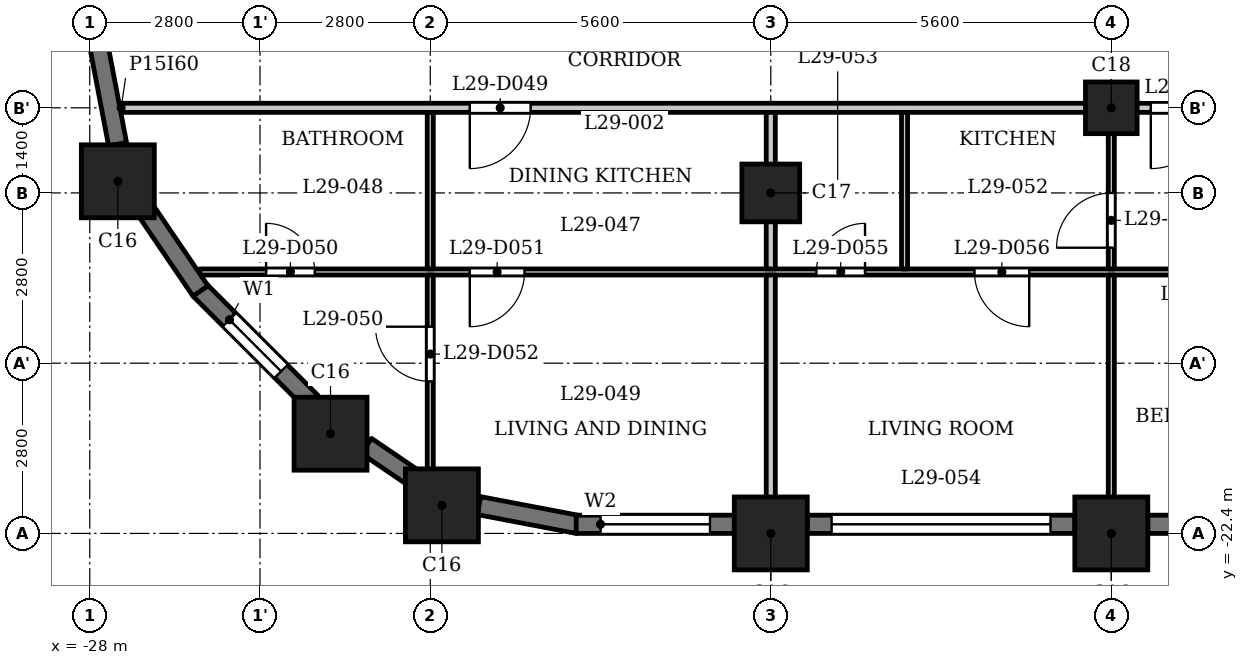
"""IFC4 building model, lengths in metres.
Left out: names, types, materials, properties, quantities, classifications, styles, units other than length and angle.
Written with IfcOpenShell. Run it as: python <this file> out.ifc"""

import sys

from ifc_helpers import new_model, si_unit, direction, frame, frame_2d, origin, origin_2d, place, context, subcontext, project, spatial, rectangle, extrude, element, fill, save


model = new_model("IFC4")
c1 = context("Model", 3, precision=1e-05, world=origin(), true_north=direction((0.0, 1.0)))
c2 = subcontext(c1, "Body", "Model", "MODEL_VIEW")
j1 = project(units=[si_unit("LENGTHUNIT", "METRE"), si_unit("PLANEANGLEUNIT", "RADIAN")], contexts=[c1])
p1 = place(None, origin())
s1 = spatial("IfcSite", under=j1, at=p1, CompositionType="ELEMENT")
p2 = place(p1, origin())
s2 = spatial("IfcBuilding", under=s1, at=p2, CompositionType="ELEMENT")
p3 = place(p2, frame((0.0, 0.0, 114.8)))
s3 = spatial("IfcBuildingStorey", under=s2, at=p3, CompositionType="ELEMENT", Elevation=114.8)
for number, where, z_axis, x_axis in (
    (1, (-22.209, -21.938, 0.0), (0.0, 0.0, 1.0), (1.0, 0.0, 0.0)),
    (2, (-16.8, -22.4, 0.0), (0.0, 0.0, 1.0), (1.0, 0.0, 0.0)),
    (3, (-11.2, -22.4, 0.0), (0.0, 0.0, 1.0), (1.0, 0.0, 0.0)),
    (4, (-27.538, -16.609, 0.0), (0.0, 0.0, 1.0), (1.0, 0.0, 0.0)),
    (5, (-24.04, -20.76, 0.0), (0.0, 0.0, 1.0), (1.0, 0.0, 0.0)),
):
    element("IfcColumn", number, at=place(p3, frame(where, z_axis=z_axis, x_axis=x_axis)), inside=s3, PredefinedType="COLUMN", context=c2, shape_type="SweptSolid", body=[
        extrude(rectangle(XDim=1.2, YDim=1.2, at=origin_2d()), origin(), (0.0, 0.0, 1.0), 3.5),
    ])
p4 = place(p3, frame((-16.8, -16.8, 0.0), z_axis=(0.0, 0.0, 1.0), x_axis=(1.0, 0.0, 0.0)))
e6 = element("IfcColumn", 6, at=p4, inside=s3, PredefinedType="COLUMN", context=c2, shape_type="SweptSolid", body=[
    extrude(rectangle(XDim=0.95, YDim=0.95, at=origin_2d()), origin(), (0.0, 0.0, 1.0), 3.5),
])
p5 = place(p3, frame((-11.2, -15.4, 0.0), z_axis=(0.0, 0.0, 1.0), x_axis=(1.0, 0.0, 0.0)))
e7 = element("IfcColumn", 7, at=p5, inside=s3, PredefinedType="COLUMN", context=c2, shape_type="SweptSolid", body=[
    extrude(rectangle(XDim=0.85, YDim=0.85, at=origin_2d()), origin(), (0.0, 0.0, 1.0), 3.5),
])
p6 = place(p3, frame((-26.197, -18.391, 0.0), z_axis=(0.0, 0.0, 1.0), x_axis=(0.707059830104, -0.707153729152, 0.0)))
e8 = element("IfcWall", 8, at=p6, inside=s3, PredefinedType="SOLIDWALL", context=c2, shape_type="SweptSolid", body=[
    extrude(rectangle(XDim=2.6, YDim=0.3, at=frame_2d((1.3, 0.0))), origin(), (0.0, 0.0, 1.0), 2.4),
])
p7 = place(p6, frame((0.7, 0.0, 0.6)))
e9 = element("IfcOpeningElement", 9, at=p7, cuts=e8, PredefinedType="OPENING", context=c2, shape_type="SweptSolid", body=[
    extrude(rectangle(XDim=1.2, YDim=1.55, at=frame_2d((0.6, 0.775))), frame((0.0, 0.16, 0.0), z_axis=(0.0, -1.0, 0.0), x_axis=(1.0, 0.0, 0.0)), (0.0, 0.0, 1.0), 0.32),
])
p8 = place(p3, frame((-23.451, -20.96, 0.0), z_axis=(0.0, 0.0, 1.0), x_axis=(0.827019434577, -0.562173331661, 0.0)))
e10 = element("IfcWall", 10, at=p8, inside=s3, PredefinedType="SOLIDWALL", context=c2, shape_type="SweptSolid", body=[
    extrude(rectangle(XDim=0.977, YDim=0.3, at=frame_2d((0.489, 0.0))), origin(), (0.0, 0.0, 1.0), 3.2),
])
p9 = place(p3, frame((-21.599, -21.942, 0.0), z_axis=(0.0, 0.0, 1.0), x_axis=(0.98228820662, -0.187376303559, 0.0)))
e11 = element("IfcWall", 11, at=p9, inside=s3, PredefinedType="SOLIDWALL", context=c2, shape_type="SweptSolid", body=[
    extrude(rectangle(XDim=1.656, YDim=0.3, at=frame_2d((0.828, 0.0))), origin(), (0.0, 0.0, 1.0), 2.4),
])
p10 = place(p3, frame((-20.0, -22.25, 0.0), z_axis=(0.0, 0.0, 1.0), x_axis=(1.0, 0.0, 0.0)))
e12 = element("IfcWall", 12, at=p10, inside=s3, PredefinedType="SOLIDWALL", context=c2, shape_type="SweptSolid", body=[
    extrude(rectangle(XDim=2.6, YDim=0.3, at=frame_2d((1.3, 0.0))), origin(), (0.0, 0.0, 1.0), 2.4),
])
p11 = place(p10, frame((0.4, 0.0, 0.9)))
e13 = element("IfcOpeningElement", 13, at=p11, cuts=e12, PredefinedType="OPENING", context=c2, shape_type="SweptSolid", body=[
    extrude(rectangle(XDim=1.8, YDim=1.25, at=frame_2d((0.9, 0.625))), frame((0.0, 0.16, 0.0), z_axis=(0.0, -1.0, 0.0), x_axis=(1.0, 0.0, 0.0)), (0.0, 0.0, 1.0), 0.32),
])
p12 = place(p3, frame((-16.2, -22.25, 0.0), z_axis=(0.0, 0.0, 1.0), x_axis=(1.0, 0.0, 0.0)))
e14 = element("IfcWall", 14, at=p12, inside=s3, PredefinedType="SOLIDWALL", context=c2, shape_type="SweptSolid", body=[
    extrude(rectangle(XDim=4.4, YDim=0.3, at=frame_2d((2.2, 0.0))), origin(), (0.0, 0.0, 1.0), 2.4),
])
p13 = place(p12, frame((0.4, 0.0, 1.2)))
e15 = element("IfcOpeningElement", 15, at=p13, cuts=e14, PredefinedType="OPENING", context=c2, shape_type="SweptSolid", body=[
    extrude(rectangle(XDim=3.6, YDim=0.95, at=frame_2d((1.8, 0.475))), frame((0.0, 0.16, 0.0), z_axis=(0.0, -1.0, 0.0), x_axis=(1.0, 0.0, 0.0)), (0.0, 0.0, 1.0), 0.32),
])
p14 = place(p3, frame((-10.6, -22.25, 0.0), z_axis=(0.0, 0.0, 1.0), x_axis=(1.0, 0.0, 0.0)))
e16 = element("IfcWall", 16, at=p14, inside=s3, PredefinedType="SOLIDWALL", context=c2, shape_type="SweptSolid", body=[
    extrude(rectangle(XDim=4.4, YDim=0.3, at=frame_2d((2.2, 0.0))), origin(), (0.0, 0.0, 1.0), 2.4),
])
p15 = place(p14, frame((0.363, 0.0, 0.6)))
e17 = element("IfcOpeningElement", 17, at=p15, cuts=e16, PredefinedType="OPENING", context=c2, shape_type="SweptSolid", body=[
    extrude(rectangle(XDim=1.2, YDim=1.55, at=frame_2d((0.6, 0.775))), frame((0.0, 0.16, 0.0), z_axis=(0.0, -1.0, 0.0), x_axis=(1.0, 0.0, 0.0)), (0.0, 0.0, 1.0), 0.32),
])
p16 = place(p14, frame((2.337, 0.0, 0.9)))
e18 = element("IfcOpeningElement", 18, at=p16, cuts=e16, PredefinedType="OPENING", context=c2, shape_type="SweptSolid", body=[
    extrude(rectangle(XDim=1.8, YDim=1.25, at=frame_2d((0.9, 0.625))), frame((0.0, 0.16, 0.0), z_axis=(0.0, -1.0, 0.0), x_axis=(1.0, 0.0, 0.0)), (0.0, 0.0, 1.0), 0.32),
])
for number, where, z_axis, x_axis in (
    (19, (-27.853, -14.372, 0.0), (0.0, 0.0, 1.0), (0.187, -0.982, 0.0)),
    (20, (-27.11, -17.043, 0.0), (0.0, 0.0, 1.0), (0.562, -0.827, 0.0)),
):
    element("IfcWall", number, at=place(p3, frame(where, z_axis=z_axis, x_axis=x_axis)), inside=s3, PredefinedType="SOLIDWALL", context=c2, shape_type="SweptSolid", body=[
        extrude(rectangle(XDim=1.656, YDim=0.3, at=frame_2d((0.828, 0.0))), origin(), (0.0, 0.0, 1.0), 2.4),
    ])
p17 = place(p3, frame((-26.19, -18.1, 0.0), z_axis=(0.0, 0.0, 1.0), x_axis=(1.0, 0.0, 0.0)))
e21 = element("IfcWall", 21, at=p17, inside=s3, PredefinedType="PARTITIONING", context=c2, shape_type="SweptSolid", body=[
    extrude(rectangle(XDim=52.63, YDim=0.1, at=frame_2d((26.315, 0.0))), origin(), (0.0, 0.0, 1.0), 3.2),
])
p18 = place(p17, frame((1.09, 0.0, 0.0)))
e22 = element("IfcOpeningElement", 22, at=p18, cuts=e21, PredefinedType="OPENING", context=c2, shape_type="SweptSolid", body=[
    extrude(rectangle(XDim=0.8, YDim=2.1, at=frame_2d((0.4, 1.05))), frame((0.0, 0.06, 0.0), z_axis=(0.0, -1.0, 0.0), x_axis=(1.0, 0.0, 0.0)), (0.0, 0.0, 1.0), 0.12),
])
p19 = place(p17, frame((4.44, 0.0, 0.0)))
e23 = element("IfcOpeningElement", 23, at=p19, cuts=e21, PredefinedType="OPENING", context=c2, shape_type="SweptSolid", body=[
    extrude(rectangle(XDim=0.9, YDim=2.1, at=frame_2d((0.45, 1.05))), frame((0.0, 0.06, 0.0), z_axis=(0.0, -1.0, 0.0), x_axis=(1.0, 0.0, 0.0)), (0.0, 0.0, 1.0), 0.12),
])
p20 = place(p17, frame((10.14, 0.0, 0.0)))
e24 = element("IfcOpeningElement", 24, at=p20, cuts=e21, PredefinedType="OPENING", context=c2, shape_type="SweptSolid", body=[
    extrude(rectangle(XDim=0.8, YDim=2.1, at=frame_2d((0.4, 1.05))), frame((0.0, 0.06, 0.0), z_axis=(0.0, -1.0, 0.0), x_axis=(1.0, 0.0, 0.0)), (0.0, 0.0, 1.0), 0.12),
])
p21 = place(p17, frame((12.74, 0.0, 0.0)))
e25 = element("IfcOpeningElement", 25, at=p21, cuts=e21, PredefinedType="OPENING", context=c2, shape_type="SweptSolid", body=[
    extrude(rectangle(XDim=0.9, YDim=2.1, at=frame_2d((0.45, 1.05))), frame((0.0, 0.06, 0.0), z_axis=(0.0, -1.0, 0.0), x_axis=(1.0, 0.0, 0.0)), (0.0, 0.0, 1.0), 0.12),
])
p22 = place(p17, frame((16.14, 0.0, 0.0)))
e26 = element("IfcOpeningElement", 26, at=p22, cuts=e21, PredefinedType="OPENING", context=c2, shape_type="SweptSolid", body=[
    extrude(rectangle(XDim=0.9, YDim=2.1, at=frame_2d((0.45, 1.05))), frame((0.0, 0.06, 0.0), z_axis=(0.0, -1.0, 0.0), x_axis=(1.0, 0.0, 0.0)), (0.0, 0.0, 1.0), 0.12),
])
p23 = place(p17, frame((18.99, 0.0, 0.0)))
e27 = element("IfcOpeningElement", 27, at=p23, cuts=e21, PredefinedType="OPENING", context=c2, shape_type="SweptSolid", body=[
    extrude(rectangle(XDim=0.9, YDim=2.1, at=frame_2d((0.45, 1.05))), frame((0.0, 0.06, 0.0), z_axis=(0.0, -1.0, 0.0), x_axis=(1.0, 0.0, 0.0)), (0.0, 0.0, 1.0), 0.12),
])
p24 = place(p17, frame((26.84, 0.0, 0.0)))
e28 = element("IfcOpeningElement", 28, at=p24, cuts=e21, PredefinedType="OPENING", context=c2, shape_type="SweptSolid", body=[
    extrude(rectangle(XDim=0.8, YDim=2.1, at=frame_2d((0.4, 1.05))), frame((0.0, 0.06, 0.0), z_axis=(0.0, -1.0, 0.0), x_axis=(1.0, 0.0, 0.0)), (0.0, 0.0, 1.0), 0.12),
])
p25 = place(p17, frame((21.24, 0.0, 0.0)))
e29 = element("IfcOpeningElement", 29, at=p25, cuts=e21, PredefinedType="OPENING", context=c2, shape_type="SweptSolid", body=[
    extrude(rectangle(XDim=0.9, YDim=2.1, at=frame_2d((0.45, 1.05))), frame((0.0, 0.06, 0.0), z_axis=(0.0, -1.0, 0.0), x_axis=(1.0, 0.0, 0.0)), (0.0, 0.0, 1.0), 0.12),
])
p26 = place(p17, frame((32.54, 0.0, 0.0)))
e30 = element("IfcOpeningElement", 30, at=p26, cuts=e21, PredefinedType="OPENING", context=c2, shape_type="SweptSolid", body=[
    extrude(rectangle(XDim=0.8, YDim=2.1, at=frame_2d((0.4, 1.05))), frame((0.0, 0.06, 0.0), z_axis=(0.0, -1.0, 0.0), x_axis=(1.0, 0.0, 0.0)), (0.0, 0.0, 1.0), 0.12),
])
p27 = place(p17, frame((35.14, 0.0, 0.0)))
e31 = element("IfcOpeningElement", 31, at=p27, cuts=e21, PredefinedType="OPENING", context=c2, shape_type="SweptSolid", body=[
    extrude(rectangle(XDim=0.9, YDim=2.1, at=frame_2d((0.45, 1.05))), frame((0.0, 0.06, 0.0), z_axis=(0.0, -1.0, 0.0), x_axis=(1.0, 0.0, 0.0)), (0.0, 0.0, 1.0), 0.12),
])
p28 = place(p17, frame((38.54, 0.0, 0.0)))
e32 = element("IfcOpeningElement", 32, at=p28, cuts=e21, PredefinedType="OPENING", context=c2, shape_type="SweptSolid", body=[
    extrude(rectangle(XDim=0.9, YDim=2.1, at=frame_2d((0.45, 1.05))), frame((0.0, 0.06, 0.0), z_axis=(0.0, -1.0, 0.0), x_axis=(1.0, 0.0, 0.0)), (0.0, 0.0, 1.0), 0.12),
])
p29 = place(p17, frame((41.39, 0.0, 0.0)))
e33 = element("IfcOpeningElement", 33, at=p29, cuts=e21, PredefinedType="OPENING", context=c2, shape_type="SweptSolid", body=[
    extrude(rectangle(XDim=0.9, YDim=2.1, at=frame_2d((0.45, 1.05))), frame((0.0, 0.06, 0.0), z_axis=(0.0, -1.0, 0.0), x_axis=(1.0, 0.0, 0.0)), (0.0, 0.0, 1.0), 0.12),
])
p30 = place(p17, frame((49.204, 0.0, 0.0)))
e34 = element("IfcOpeningElement", 34, at=p30, cuts=e21, PredefinedType="OPENING", context=c2, shape_type="SweptSolid", body=[
    extrude(rectangle(XDim=0.8, YDim=2.1, at=frame_2d((0.4, 1.05))), frame((0.0, 0.06, 0.0), z_axis=(0.0, -1.0, 0.0), x_axis=(1.0, 0.0, 0.0)), (0.0, 0.0, 1.0), 0.12),
])
p31 = place(p17, frame((43.64, 0.0, 0.0)))
e35 = element("IfcOpeningElement", 35, at=p31, cuts=e21, PredefinedType="OPENING", context=c2, shape_type="SweptSolid", body=[
    extrude(rectangle(XDim=0.9, YDim=2.1, at=frame_2d((0.45, 1.05))), frame((0.0, 0.06, 0.0), z_axis=(0.0, -1.0, 0.0), x_axis=(1.0, 0.0, 0.0)), (0.0, 0.0, 1.0), 0.12),
])
p32 = place(p3, frame((-27.484, -15.4, 0.0), z_axis=(0.0, 0.0, 1.0), x_axis=(1.0, 0.0, 0.0)))
e36 = element("IfcWall", 36, at=p32, inside=s3, PredefinedType="PARTITIONING", context=c2, shape_type="SweptSolid", body=[
    extrude(rectangle(XDim=54.968, YDim=0.15, at=frame_2d((27.484, 0.0))), origin(), (0.0, 0.0, 1.0), 3.2),
])
p33 = place(p32, frame((5.734, 0.0, 0.0)))
e37 = element("IfcOpeningElement", 37, at=p33, cuts=e36, PredefinedType="OPENING", context=c2, shape_type="SweptSolid", body=[
    extrude(rectangle(XDim=1.0, YDim=2.1, at=frame_2d((0.5, 1.05))), frame((0.0, 0.085, 0.0), z_axis=(0.0, -1.0, 0.0), x_axis=(1.0, 0.0, 0.0)), (0.0, 0.0, 1.0), 0.17),
])
p34 = place(p32, frame((16.934, 0.0, 0.0)))
e38 = element("IfcOpeningElement", 38, at=p34, cuts=e36, PredefinedType="OPENING", context=c2, shape_type="SweptSolid", body=[
    extrude(rectangle(XDim=1.0, YDim=2.1, at=frame_2d((0.5, 1.05))), frame((0.0, 0.085, 0.0), z_axis=(0.0, -1.0, 0.0), x_axis=(1.0, 0.0, 0.0)), (0.0, 0.0, 1.0), 0.17),
])
p35 = place(p32, frame((22.534, 0.0, 0.0)))
e39 = element("IfcOpeningElement", 39, at=p35, cuts=e36, PredefinedType="OPENING", context=c2, shape_type="SweptSolid", body=[
    extrude(rectangle(XDim=1.0, YDim=2.1, at=frame_2d((0.5, 1.05))), frame((0.0, 0.085, 0.0), z_axis=(0.0, -1.0, 0.0), x_axis=(1.0, 0.0, 0.0)), (0.0, 0.0, 1.0), 0.17),
])
p36 = place(p32, frame((39.334, 0.0, 0.0)))
e40 = element("IfcOpeningElement", 40, at=p36, cuts=e36, PredefinedType="OPENING", context=c2, shape_type="SweptSolid", body=[
    extrude(rectangle(XDim=1.0, YDim=2.1, at=frame_2d((0.5, 1.05))), frame((0.0, 0.085, 0.0), z_axis=(0.0, -1.0, 0.0), x_axis=(1.0, 0.0, 0.0)), (0.0, 0.0, 1.0), 0.17),
])
p37 = place(p32, frame((44.934, 0.0, 0.0)))
e41 = element("IfcOpeningElement", 41, at=p37, cuts=e36, PredefinedType="OPENING", context=c2, shape_type="SweptSolid", body=[
    extrude(rectangle(XDim=1.0, YDim=2.1, at=frame_2d((0.5, 1.05))), frame((0.0, 0.085, 0.0), z_axis=(0.0, -1.0, 0.0), x_axis=(1.0, 0.0, 0.0)), (0.0, 0.0, 1.0), 0.17),
])
p38 = place(p3, frame((-22.4, -21.72, 0.0), z_axis=(0.0, 0.0, 1.0), x_axis=(0.0, 1.0, 0.0)))
e42 = element("IfcWall", 42, at=p38, inside=s3, PredefinedType="PARTITIONING", context=c2, shape_type="SweptSolid", body=[
    extrude(rectangle(XDim=3.57, YDim=0.1, at=frame_2d((1.785, 0.0))), origin(), (0.0, 0.0, 1.0), 3.2),
])
p39 = place(p38, frame((1.82, 0.0, 0.0)))
e43 = element("IfcOpeningElement", 43, at=p39, cuts=e42, PredefinedType="OPENING", context=c2, shape_type="SweptSolid", body=[
    extrude(rectangle(XDim=0.9, YDim=2.1, at=frame_2d((0.45, 1.05))), frame((0.0, 0.06, 0.0), z_axis=(0.0, -1.0, 0.0), x_axis=(1.0, 0.0, 0.0)), (0.0, 0.0, 1.0), 0.12),
])
p40 = place(p3, frame((-22.4, -18.05, 0.0), z_axis=(0.0, 0.0, 1.0), x_axis=(0.0, 1.0, 0.0)))
e44 = element("IfcWall", 44, at=p40, inside=s3, PredefinedType="PARTITIONING", context=c2, shape_type="SweptSolid", body=[
    extrude(rectangle(XDim=2.575, YDim=0.1, at=frame_2d((1.288, 0.0))), origin(), (0.0, 0.0, 1.0), 3.2),
])
p41 = place(p3, frame((-16.8, -22.98, 0.0), z_axis=(0.0, 0.0, 1.0), x_axis=(0.0, 1.0, 0.0)))
e45 = element("IfcWall", 45, at=p41, inside=s3, PredefinedType="PARTITIONING", context=c2, shape_type="SweptSolid", body=[
    extrude(rectangle(XDim=4.83, YDim=0.15, at=frame_2d((2.415, 0.0))), origin(), (0.0, 0.0, 1.0), 3.2),
])
p42 = place(p3, frame((-16.8, -18.05, 0.0), z_axis=(0.0, 0.0, 1.0), x_axis=(0.0, 1.0, 0.0)))
e46 = element("IfcWall", 46, at=p42, inside=s3, PredefinedType="PARTITIONING", context=c2, shape_type="SweptSolid", body=[
    extrude(rectangle(XDim=2.575, YDim=0.15, at=frame_2d((1.288, 0.0))), origin(), (0.0, 0.0, 1.0), 3.2),
])
p43 = place(p3, frame((-14.6, -18.05, 0.0), z_axis=(0.0, 0.0, 1.0), x_axis=(0.0, 1.0, 0.0)))
e47 = element("IfcWall", 47, at=p43, inside=s3, PredefinedType="PARTITIONING", context=c2, shape_type="SweptSolid", body=[
    extrude(rectangle(XDim=2.575, YDim=0.1, at=frame_2d((1.288, 0.0))), origin(), (0.0, 0.0, 1.0), 3.2),
])
p44 = place(p3, frame((-11.2, -22.98, 0.0), z_axis=(0.0, 0.0, 1.0), x_axis=(0.0, 1.0, 0.0)))
e48 = element("IfcWall", 48, at=p44, inside=s3, PredefinedType="PARTITIONING", context=c2, shape_type="SweptSolid", body=[
    extrude(rectangle(XDim=4.83, YDim=0.1, at=frame_2d((2.415, 0.0))), origin(), (0.0, 0.0, 1.0), 3.2),
])
p45 = place(p3, frame((-11.2, -18.05, 0.0), z_axis=(0.0, 0.0, 1.0), x_axis=(0.0, 1.0, 0.0)))
e49 = element("IfcWall", 49, at=p45, inside=s3, PredefinedType="PARTITIONING", context=c2, shape_type="SweptSolid", body=[
    extrude(rectangle(XDim=2.575, YDim=0.1, at=frame_2d((1.288, 0.0))), origin(), (0.0, 0.0, 1.0), 3.2),
])
p46 = place(p45, frame((0.349, 0.0, 0.0)))
e50 = element("IfcOpeningElement", 50, at=p46, cuts=e49, PredefinedType="OPENING", context=c2, shape_type="SweptSolid", body=[
    extrude(rectangle(XDim=0.9, YDim=2.1, at=frame_2d((0.45, 1.05))), frame((0.0, 0.06, 0.0), z_axis=(0.0, -1.0, 0.0), x_axis=(1.0, 0.0, 0.0)), (0.0, 0.0, 1.0), 0.12),
])
p47 = place(p33, origin())
e51 = element("IfcDoor", 51, at=p47, inside=s3, OperationType="SINGLE_SWING_LEFT", PredefinedType="DOOR", context=c2, shape_type="SweptSolid", body=[
    extrude(rectangle(XDim=1.0, YDim=2.1, at=frame_2d((0.5, 1.05))), frame((0.0, 0.025, 0.0), z_axis=(0.0, -1.0, 0.0), x_axis=(1.0, 0.0, 0.0)), (0.0, 0.0, 1.0), 0.05),
])
fill(e37, e51)
p48 = place(p18, origin())
e52 = element("IfcDoor", 52, at=p48, inside=s3, OperationType="SINGLE_SWING_RIGHT", PredefinedType="DOOR", context=c2, shape_type="SweptSolid", body=[
    extrude(rectangle(XDim=0.8, YDim=2.1, at=frame_2d((0.4, 1.05))), frame((0.0, 0.025, 0.0), z_axis=(0.0, -1.0, 0.0), x_axis=(1.0, 0.0, 0.0)), (0.0, 0.0, 1.0), 0.05),
])
fill(e22, e52)
p49 = place(p19, origin())
e53 = element("IfcDoor", 53, at=p49, inside=s3, OperationType="SINGLE_SWING_LEFT", PredefinedType="DOOR", context=c2, shape_type="SweptSolid", body=[
    extrude(rectangle(XDim=0.9, YDim=2.1, at=frame_2d((0.45, 1.05))), frame((0.0, 0.025, 0.0), z_axis=(0.0, -1.0, 0.0), x_axis=(1.0, 0.0, 0.0)), (0.0, 0.0, 1.0), 0.05),
])
fill(e23, e53)
p50 = place(p39, origin())
e54 = element("IfcDoor", 54, at=p50, inside=s3, OperationType="SINGLE_SWING_LEFT", PredefinedType="DOOR", context=c2, shape_type="SweptSolid", body=[
    extrude(rectangle(XDim=0.9, YDim=2.1, at=frame_2d((0.45, 1.05))), frame((0.0, 0.025, 0.0), z_axis=(0.0, -1.0, 0.0), x_axis=(1.0, 0.0, 0.0)), (0.0, 0.0, 1.0), 0.05),
])
fill(e43, e54)
p51 = place(p34, origin())
e55 = element("IfcDoor", 55, at=p51, inside=s3, OperationType="SINGLE_SWING_LEFT", PredefinedType="DOOR", context=c2, shape_type="SweptSolid", body=[
    extrude(rectangle(XDim=1.0, YDim=2.1, at=frame_2d((0.5, 1.05))), frame((0.0, 0.025, 0.0), z_axis=(0.0, -1.0, 0.0), x_axis=(1.0, 0.0, 0.0)), (0.0, 0.0, 1.0), 0.05),
])
fill(e38, e55)
p52 = place(p46, origin())
e56 = element("IfcDoor", 56, at=p52, inside=s3, OperationType="SINGLE_SWING_RIGHT", PredefinedType="DOOR", context=c2, shape_type="SweptSolid", body=[
    extrude(rectangle(XDim=0.9, YDim=2.1, at=frame_2d((0.45, 1.05))), frame((0.0, 0.025, 0.0), z_axis=(0.0, -1.0, 0.0), x_axis=(1.0, 0.0, 0.0)), (0.0, 0.0, 1.0), 0.05),
])
fill(e50, e56)
p53 = place(p20, origin())
e57 = element("IfcDoor", 57, at=p53, inside=s3, OperationType="SINGLE_SWING_LEFT", PredefinedType="DOOR", context=c2, shape_type="SweptSolid", body=[
    extrude(rectangle(XDim=0.8, YDim=2.1, at=frame_2d((0.4, 1.05))), frame((0.0, 0.025, 0.0), z_axis=(0.0, -1.0, 0.0), x_axis=(1.0, 0.0, 0.0)), (0.0, 0.0, 1.0), 0.05),
])
fill(e24, e57)
p54 = place(p21, origin())
e58 = element("IfcDoor", 58, at=p54, inside=s3, OperationType="SINGLE_SWING_RIGHT", PredefinedType="DOOR", context=c2, shape_type="SweptSolid", body=[
    extrude(rectangle(XDim=0.9, YDim=2.1, at=frame_2d((0.45, 1.05))), frame((0.0, 0.025, 0.0), z_axis=(0.0, -1.0, 0.0), x_axis=(1.0, 0.0, 0.0)), (0.0, 0.0, 1.0), 0.05),
])
fill(e25, e58)
p55 = place(p7, origin())
e59 = element("IfcWindow", 59, at=p55, inside=s3, PartitioningType="SINGLE_PANEL", PredefinedType="WINDOW", context=c2, shape_type="SweptSolid", body=[
    extrude(rectangle(XDim=1.2, YDim=1.55, at=frame_2d((0.6, 0.775))), frame((0.0, 0.03, 0.0), z_axis=(0.0, -1.0, 0.0), x_axis=(1.0, 0.0, 0.0)), (0.0, 0.0, 1.0), 0.06),
])
fill(e9, e59)
p56 = place(p11, origin())
e60 = element("IfcWindow", 60, at=p56, inside=s3, PartitioningType="SINGLE_PANEL", PredefinedType="WINDOW", context=c2, shape_type="SweptSolid", body=[
    extrude(rectangle(XDim=1.8, YDim=1.25, at=frame_2d((0.9, 0.625))), frame((0.0, 0.03, 0.0), z_axis=(0.0, -1.0, 0.0), x_axis=(1.0, 0.0, 0.0)), (0.0, 0.0, 1.0), 0.06),
])
fill(e13, e60)
p57 = place(p13, origin())
e61 = element("IfcWindow", 61, at=p57, inside=s3, PartitioningType="SINGLE_PANEL", PredefinedType="WINDOW", context=c2, shape_type="SweptSolid", body=[
    extrude(rectangle(XDim=3.6, YDim=0.95, at=frame_2d((1.8, 0.475))), frame((0.0, 0.03, 0.0), z_axis=(0.0, -1.0, 0.0), x_axis=(1.0, 0.0, 0.0)), (0.0, 0.0, 1.0), 0.06),
])
fill(e15, e61)
save(model, sys.argv[1])
